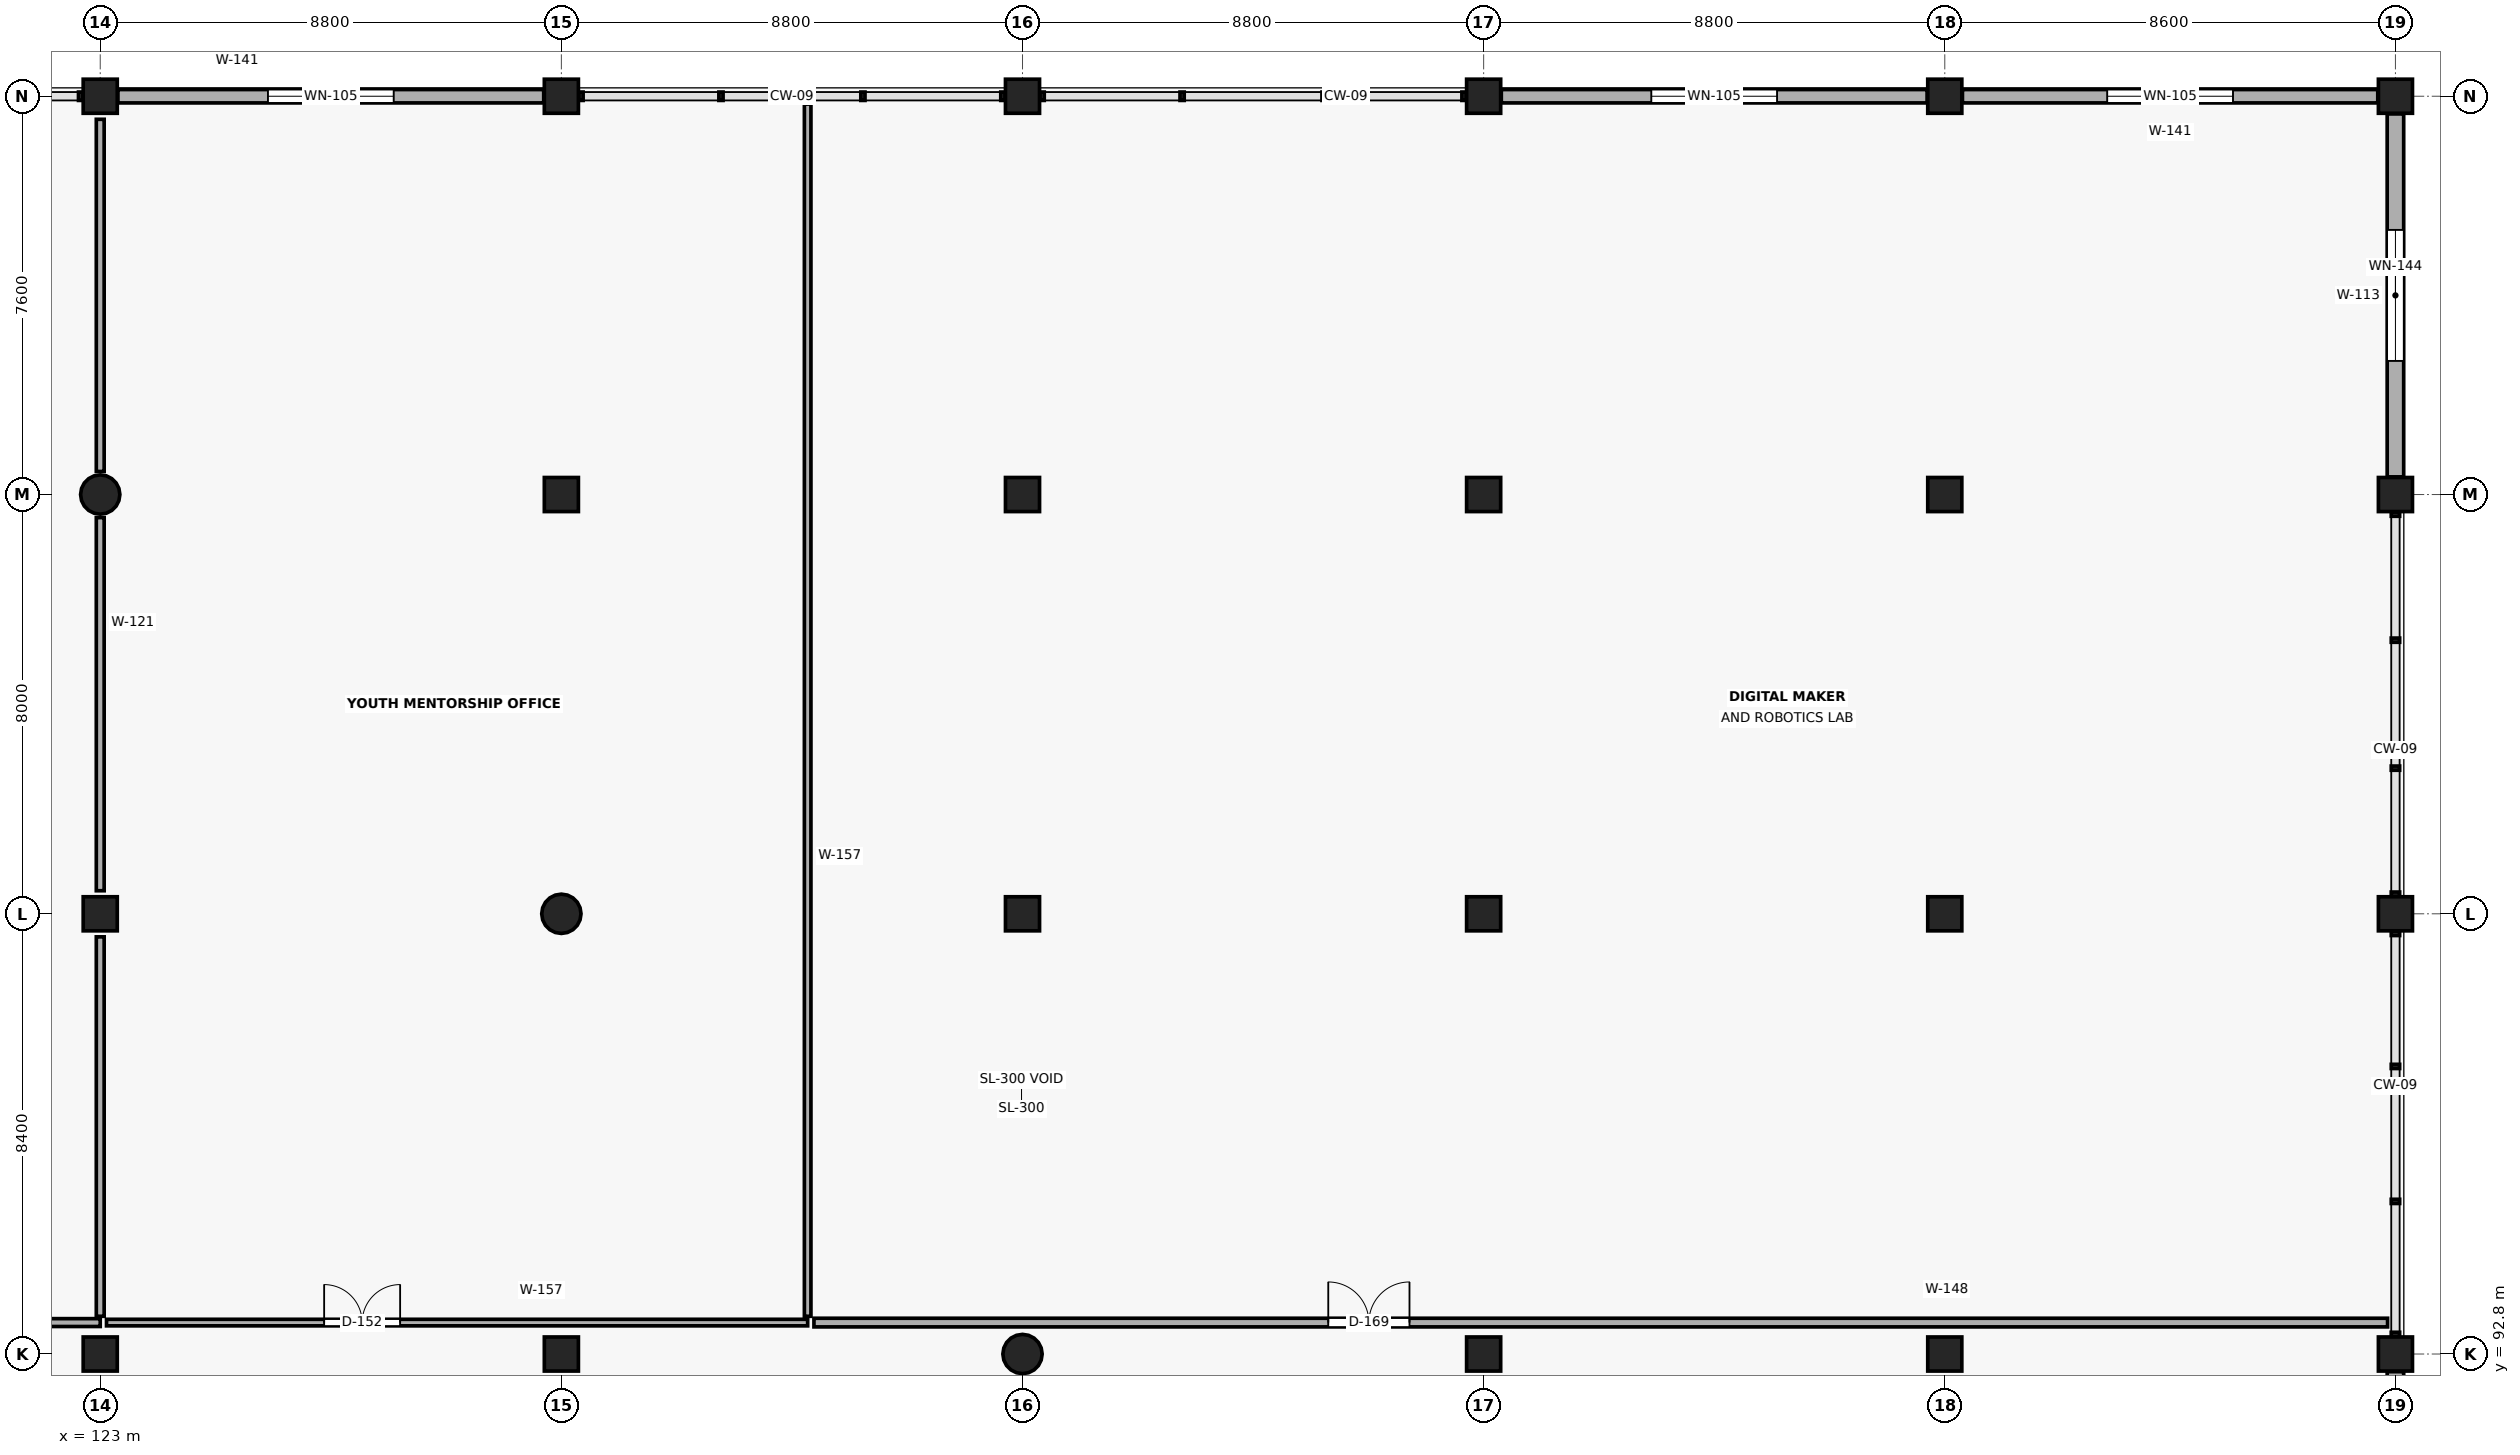
"""IFC4 building model, lengths in metres.
Left out: names, types, materials, properties, quantities, classifications, styles, units other than length and angle.
Written with IfcOpenShell. Run it as: python <this file> out.ifc"""

import sys

from ifc_helpers import new_model, si_unit, direction, frame, frame_2d, origin, origin_2d, place, context, subcontext, project, spatial, rectangle, circle, extrude, element, fill, save


model = new_model("IFC4")
c1 = context("Model", 3, precision=1e-05, world=origin(), true_north=direction((0.0, 1.0)))
c2 = subcontext(c1, "Body", "Model", "MODEL_VIEW")
j1 = project(units=[si_unit("LENGTHUNIT", "METRE"), si_unit("PLANEANGLEUNIT", "RADIAN")], contexts=[c1])
p1 = place(None, origin())
s1 = spatial("IfcSite", under=j1, at=p1, CompositionType="ELEMENT")
p2 = place(p1, origin())
s2 = spatial("IfcBuilding", under=s1, at=p2, CompositionType="ELEMENT")
p3 = place(p2, frame((0.0, 0.0, 5.1)))
s3 = spatial("IfcBuildingStorey", under=s2, at=p3, CompositionType="ELEMENT", Elevation=5.1)
for number, where, z_axis, x_axis in (
    (1, (123.0, 92.8, 0.0), (0.0, 0.0, 1.0), (1.0, 0.0, 0.0)),
    (2, (123.0, 101.2, 0.0), (0.0, 0.0, 1.0), (1.0, 0.0, 0.0)),
):
    element("IfcColumn", number, at=place(p3, frame(where, z_axis=z_axis, x_axis=x_axis)), inside=s3, PredefinedType="COLUMN", context=c2, shape_type="SweptSolid", body=[
        extrude(rectangle(XDim=0.65, YDim=0.65, at=origin_2d()), origin(), (0.0, 0.0, 1.0), 4.8),
    ])
p4 = place(p3, frame((123.0, 109.2, 0.0), z_axis=(0.0, 0.0, 1.0), x_axis=(1.0, 0.0, 0.0)))
e3 = element("IfcColumn", 3, at=p4, inside=s3, PredefinedType="COLUMN", context=c2, shape_type="SweptSolid", body=[
    extrude(circle(Radius=0.375, at=origin_2d()), origin(), (0.0, 0.0, 1.0), 4.8),
])
for number, where, z_axis, x_axis in (
    (4, (123.0, 116.8, 0.0), (0.0, 0.0, 1.0), (1.0, 0.0, 0.0)),
    (5, (131.8, 92.8, 0.0), (0.0, 0.0, 1.0), (1.0, 0.0, 0.0)),
):
    element("IfcColumn", number, at=place(p3, frame(where, z_axis=z_axis, x_axis=x_axis)), inside=s3, PredefinedType="COLUMN", context=c2, shape_type="SweptSolid", body=[
        extrude(rectangle(XDim=0.65, YDim=0.65, at=origin_2d()), origin(), (0.0, 0.0, 1.0), 4.8),
    ])
p5 = place(p3, frame((131.8, 101.2, 0.0), z_axis=(0.0, 0.0, 1.0), x_axis=(1.0, 0.0, 0.0)))
e6 = element("IfcColumn", 6, at=p5, inside=s3, PredefinedType="COLUMN", context=c2, shape_type="SweptSolid", body=[
    extrude(circle(Radius=0.375, at=origin_2d()), origin(), (0.0, 0.0, 1.0), 4.8),
])
for number, where, z_axis, x_axis in (
    (7, (131.8, 109.2, 0.0), (0.0, 0.0, 1.0), (1.0, 0.0, 0.0)),
    (8, (131.8, 116.8, 0.0), (0.0, 0.0, 1.0), (1.0, 0.0, 0.0)),
):
    element("IfcColumn", number, at=place(p3, frame(where, z_axis=z_axis, x_axis=x_axis)), inside=s3, PredefinedType="COLUMN", context=c2, shape_type="SweptSolid", body=[
        extrude(rectangle(XDim=0.65, YDim=0.65, at=origin_2d()), origin(), (0.0, 0.0, 1.0), 4.8),
    ])
p6 = place(p3, frame((140.6, 92.8, 0.0), z_axis=(0.0, 0.0, 1.0), x_axis=(1.0, 0.0, 0.0)))
e9 = element("IfcColumn", 9, at=p6, inside=s3, PredefinedType="COLUMN", context=c2, shape_type="SweptSolid", body=[
    extrude(circle(Radius=0.375, at=origin_2d()), origin(), (0.0, 0.0, 1.0), 4.8),
])
for number, where, z_axis, x_axis in (
    (10, (140.6, 101.2, 0.0), (0.0, 0.0, 1.0), (1.0, 0.0, 0.0)),
    (11, (140.6, 109.2, 0.0), (0.0, 0.0, 1.0), (1.0, 0.0, 0.0)),
    (12, (140.6, 116.8, 0.0), (0.0, 0.0, 1.0), (1.0, 0.0, 0.0)),
    (13, (149.4, 92.8, 0.0), (0.0, 0.0, 1.0), (1.0, 0.0, 0.0)),
    (14, (149.4, 101.2, 0.0), (0.0, 0.0, 1.0), (1.0, 0.0, 0.0)),
    (15, (149.4, 109.2, 0.0), (0.0, 0.0, 1.0), (1.0, 0.0, 0.0)),
    (16, (149.4, 116.8, 0.0), (0.0, 0.0, 1.0), (1.0, 0.0, 0.0)),
    (17, (158.2, 92.8, 0.0), (0.0, 0.0, 1.0), (1.0, 0.0, 0.0)),
    (18, (158.2, 101.2, 0.0), (0.0, 0.0, 1.0), (1.0, 0.0, 0.0)),
    (19, (158.2, 109.2, 0.0), (0.0, 0.0, 1.0), (1.0, 0.0, 0.0)),
    (20, (158.2, 116.8, 0.0), (0.0, 0.0, 1.0), (1.0, 0.0, 0.0)),
    (21, (166.8, 92.8, 0.0), (0.0, 0.0, 1.0), (1.0, 0.0, 0.0)),
    (22, (166.8, 101.2, 0.0), (0.0, 0.0, 1.0), (1.0, 0.0, 0.0)),
    (23, (166.8, 109.2, 0.0), (0.0, 0.0, 1.0), (1.0, 0.0, 0.0)),
    (24, (166.8, 116.8, 0.0), (0.0, 0.0, 1.0), (1.0, 0.0, 0.0)),
):
    element("IfcColumn", number, at=place(p3, frame(where, z_axis=z_axis, x_axis=x_axis)), inside=s3, PredefinedType="COLUMN", context=c2, shape_type="SweptSolid", body=[
        extrude(rectangle(XDim=0.65, YDim=0.65, at=origin_2d()), origin(), (0.0, 0.0, 1.0), 4.8),
    ])
p7 = place(p3, frame((123.337, 116.8, 0.0), z_axis=(0.0, 0.0, 1.0), x_axis=(1.0, 0.0, 0.0)))
e25 = element("IfcWall", 25, at=p7, inside=s3, PredefinedType="SOLIDWALL", context=c2, shape_type="SweptSolid", body=[
    extrude(rectangle(XDim=8.126, YDim=0.255, at=frame_2d((4.063, 0.0))), origin(), (0.0, 0.0, 1.0), 3.61),
])
p8 = place(p7, frame((2.863, 0.0, 0.85)))
e26 = element("IfcOpeningElement", 26, at=p8, cuts=e25, PredefinedType="OPENING", context=c2, shape_type="SweptSolid", body=[
    extrude(rectangle(XDim=2.4, YDim=2.4, at=frame_2d((1.2, 1.2))), frame((0.0, 0.139, 0.0), z_axis=(0.0, -1.0, 0.0), x_axis=(1.0, 0.0, 0.0)), (0.0, 0.0, 1.0), 0.279),
])
p9 = place(p3, frame((149.737, 116.8, 0.0), z_axis=(0.0, 0.0, 1.0), x_axis=(1.0, 0.0, 0.0)))
e27 = element("IfcWall", 27, at=p9, inside=s3, PredefinedType="SOLIDWALL", context=c2, shape_type="SweptSolid", body=[
    extrude(rectangle(XDim=8.126, YDim=0.255, at=frame_2d((4.063, 0.0))), origin(), (0.0, 0.0, 1.0), 3.61),
])
p10 = place(p9, frame((2.863, 0.0, 0.85)))
e28 = element("IfcOpeningElement", 28, at=p10, cuts=e27, PredefinedType="OPENING", context=c2, shape_type="SweptSolid", body=[
    extrude(rectangle(XDim=2.4, YDim=2.4, at=frame_2d((1.2, 1.2))), frame((0.0, 0.139, 0.0), z_axis=(0.0, -1.0, 0.0), x_axis=(1.0, 0.0, 0.0)), (0.0, 0.0, 1.0), 0.279),
])
p11 = place(p3, frame((158.537, 116.8, 0.0), z_axis=(0.0, 0.0, 1.0), x_axis=(1.0, 0.0, 0.0)))
e29 = element("IfcWall", 29, at=p11, inside=s3, PredefinedType="SOLIDWALL", context=c2, shape_type="SweptSolid", body=[
    extrude(rectangle(XDim=7.926, YDim=0.255, at=frame_2d((3.963, 0.0))), origin(), (0.0, 0.0, 1.0), 3.61),
])
p12 = place(p11, frame((2.763, 0.0, 0.85)))
e30 = element("IfcOpeningElement", 30, at=p12, cuts=e29, PredefinedType="OPENING", context=c2, shape_type="SweptSolid", body=[
    extrude(rectangle(XDim=2.4, YDim=2.4, at=frame_2d((1.2, 1.2))), frame((0.0, 0.139, 0.0), z_axis=(0.0, -1.0, 0.0), x_axis=(1.0, 0.0, 0.0)), (0.0, 0.0, 1.0), 0.279),
])
p13 = place(p3, frame((166.8, 92.463, 0.0), z_axis=(0.0, 0.0, 1.0), x_axis=(0.0, -1.0, 0.0)))
e31 = element("IfcWall", 31, at=p13, inside=s3, PredefinedType="SOLIDWALL", context=c2, shape_type="SweptSolid", body=[
    extrude(rectangle(XDim=8.101, YDim=0.315, at=frame_2d((4.05, 0.0))), origin(), (0.0, 0.0, 1.0), 3.61),
])
p14 = place(p3, frame((166.8, 116.463, 0.0), z_axis=(0.0, 0.0, 1.0), x_axis=(0.0, -1.0, 0.0)))
e32 = element("IfcWall", 32, at=p14, inside=s3, PredefinedType="SOLIDWALL", context=c2, shape_type="SweptSolid", body=[
    extrude(rectangle(XDim=6.926, YDim=0.315, at=frame_2d((3.463, 0.0))), origin(), (0.0, 0.0, 1.0), 3.61),
])
p15 = place(p14, frame((2.213, 0.0, 0.85)))
e33 = element("IfcOpeningElement", 33, at=p15, cuts=e32, PredefinedType="OPENING", context=c2, shape_type="SweptSolid", body=[
    extrude(rectangle(XDim=2.5, YDim=2.4, at=frame_2d((1.25, 1.2))), frame((0.0, 0.169, 0.0), z_axis=(0.0, -1.0, 0.0), x_axis=(1.0, 0.0, 0.0)), (0.0, 0.0, 1.0), 0.339),
])
p16 = place(p3, frame((105.2, 93.4, 0.0), z_axis=(0.0, 0.0, 1.0), x_axis=(1.0, 0.0, 0.0)))
e34 = element("IfcWall", 34, at=p16, inside=s3, PredefinedType="PARTITIONING", context=c2, shape_type="SweptSolid", body=[
    extrude(rectangle(XDim=17.8, YDim=0.15, at=frame_2d((8.9, 0.0))), origin(), (0.0, 0.0, 1.0), 4.35),
])
p17 = place(p16, frame((5.796, 0.0, 0.0)))
e35 = element("IfcOpeningElement", 35, at=p17, cuts=e34, PredefinedType="OPENING", context=c2, shape_type="SweptSolid", body=[
    extrude(rectangle(XDim=1.4, YDim=2.3, at=frame_2d((0.7, 1.15))), frame((0.0, 0.087, 0.0), z_axis=(0.0, -1.0, 0.0), x_axis=(1.0, 0.0, 0.0)), (0.0, 0.0, 1.0), 0.174),
])
p18 = place(p3, frame((123.0, 93.52, 0.0), z_axis=(0.0, 0.0, 1.0), x_axis=(0.0, 1.0, 0.0)))
e36 = element("IfcWall", 36, at=p18, inside=s3, PredefinedType="PARTITIONING", context=c2, shape_type="SweptSolid", body=[
    extrude(rectangle(XDim=7.24, YDim=0.15, at=frame_2d((3.62, 0.0))), origin(), (0.0, 0.0, 1.0), 3.5),
])
p19 = place(p3, frame((123.0, 101.64, 0.0), z_axis=(0.0, 0.0, 1.0), x_axis=(0.0, 1.0, 0.0)))
e37 = element("IfcWall", 37, at=p19, inside=s3, PredefinedType="PARTITIONING", context=c2, shape_type="SweptSolid", body=[
    extrude(rectangle(XDim=7.12, YDim=0.15, at=frame_2d((3.56, 0.0))), origin(), (0.0, 0.0, 1.0), 3.5),
])
p20 = place(p3, frame((123.0, 109.64, 0.0), z_axis=(0.0, 0.0, 1.0), x_axis=(0.0, 1.0, 0.0)))
e38 = element("IfcWall", 38, at=p20, inside=s3, PredefinedType="PARTITIONING", context=c2, shape_type="SweptSolid", body=[
    extrude(rectangle(XDim=6.72, YDim=0.15, at=frame_2d((3.36, 0.0))), origin(), (0.0, 0.0, 1.0), 3.5),
])
p21 = place(p3, frame((123.12, 93.4, 0.0), z_axis=(0.0, 0.0, 1.0), x_axis=(1.0, 0.0, 0.0)))
e39 = element("IfcWall", 39, at=p21, inside=s3, PredefinedType="PARTITIONING", context=c2, shape_type="SweptSolid", body=[
    extrude(rectangle(XDim=13.38, YDim=0.125, at=frame_2d((6.69, 0.0))), origin(), (0.0, 0.0, 1.0), 4.35),
])
p22 = place(p21, frame((4.153, 0.0, 0.0)))
e40 = element("IfcOpeningElement", 40, at=p22, cuts=e39, PredefinedType="OPENING", context=c2, shape_type="SweptSolid", body=[
    extrude(rectangle(XDim=1.45, YDim=2.35, at=frame_2d((0.725, 1.175))), frame((0.0, 0.074, 0.0), z_axis=(0.0, -1.0, 0.0), x_axis=(1.0, 0.0, 0.0)), (0.0, 0.0, 1.0), 0.149),
])
p23 = place(p3, frame((136.5, 93.52, 0.0), z_axis=(0.0, 0.0, 1.0), x_axis=(0.0, 1.0, 0.0)))
e41 = element("IfcWall", 41, at=p23, inside=s3, PredefinedType="PARTITIONING", context=c2, shape_type="SweptSolid", body=[
    extrude(rectangle(XDim=23.13, YDim=0.125, at=frame_2d((11.565, 0.0))), origin(), (0.0, 0.0, 1.0), 4.35),
])
p24 = place(p3, frame((136.62, 93.4, 0.0), z_axis=(0.0, 0.0, 1.0), x_axis=(1.0, 0.0, 0.0)))
e42 = element("IfcWall", 42, at=p24, inside=s3, PredefinedType="PARTITIONING", context=c2, shape_type="SweptSolid", body=[
    extrude(rectangle(XDim=30.03, YDim=0.165, at=frame_2d((15.015, 0.0))), origin(), (0.0, 0.0, 1.0), 4.35),
])
p25 = place(p24, frame((9.815, 0.0, 0.0)))
e43 = element("IfcOpeningElement", 43, at=p25, cuts=e42, PredefinedType="OPENING", context=c2, shape_type="SweptSolid", body=[
    extrude(rectangle(XDim=1.55, YDim=2.35, at=frame_2d((0.775, 1.175))), frame((0.0, 0.094, 0.0), z_axis=(0.0, -1.0, 0.0), x_axis=(1.0, 0.0, 0.0)), (0.0, 0.0, 1.0), 0.189),
])
p26 = place(p8, origin())
e44 = element("IfcWindow", 44, at=p26, inside=s3, PartitioningType="SINGLE_PANEL", PredefinedType="WINDOW", context=c2, shape_type="SweptSolid", body=[
    extrude(rectangle(XDim=2.4, YDim=2.4, at=frame_2d((1.2, 1.2))), frame((0.0, 0.03, 0.0), z_axis=(0.0, -1.0, 0.0), x_axis=(1.0, 0.0, 0.0)), (0.0, 0.0, 1.0), 0.06),
])
fill(e26, e44)
p27 = place(p10, origin())
e45 = element("IfcWindow", 45, at=p27, inside=s3, PartitioningType="SINGLE_PANEL", PredefinedType="WINDOW", context=c2, shape_type="SweptSolid", body=[
    extrude(rectangle(XDim=2.4, YDim=2.4, at=frame_2d((1.2, 1.2))), frame((0.0, 0.03, 0.0), z_axis=(0.0, -1.0, 0.0), x_axis=(1.0, 0.0, 0.0)), (0.0, 0.0, 1.0), 0.06),
])
fill(e28, e45)
p28 = place(p12, origin())
e46 = element("IfcWindow", 46, at=p28, inside=s3, PartitioningType="SINGLE_PANEL", PredefinedType="WINDOW", context=c2, shape_type="SweptSolid", body=[
    extrude(rectangle(XDim=2.4, YDim=2.4, at=frame_2d((1.2, 1.2))), frame((0.0, 0.03, 0.0), z_axis=(0.0, -1.0, 0.0), x_axis=(1.0, 0.0, 0.0)), (0.0, 0.0, 1.0), 0.06),
])
fill(e30, e46)
p29 = place(p15, origin())
e47 = element("IfcWindow", 47, at=p29, inside=s3, PartitioningType="SINGLE_PANEL", PredefinedType="WINDOW", context=c2, shape_type="SweptSolid", body=[
    extrude(rectangle(XDim=2.5, YDim=2.4, at=frame_2d((1.25, 1.2))), frame((0.0, 0.03, 0.0), z_axis=(0.0, -1.0, 0.0), x_axis=(1.0, 0.0, 0.0)), (0.0, 0.0, 1.0), 0.06),
])
fill(e33, e47)
p30 = place(p22, origin())
e48 = element("IfcDoor", 48, at=p30, inside=s3, OperationType="DOUBLE_DOOR_SINGLE_SWING", PredefinedType="DOOR", context=c2, shape_type="SweptSolid", body=[
    extrude(rectangle(XDim=1.45, YDim=2.35, at=frame_2d((0.725, 1.175))), frame((0.0, 0.025, 0.0), z_axis=(0.0, -1.0, 0.0), x_axis=(1.0, 0.0, 0.0)), (0.0, 0.0, 1.0), 0.05),
])
fill(e40, e48)
p31 = place(p25, origin())
e49 = element("IfcDoor", 49, at=p31, inside=s3, OperationType="DOUBLE_DOOR_SINGLE_SWING", PredefinedType="DOOR", context=c2, shape_type="SweptSolid", body=[
    extrude(rectangle(XDim=1.55, YDim=2.35, at=frame_2d((0.775, 1.175))), frame((0.0, 0.025, 0.0), z_axis=(0.0, -1.0, 0.0), x_axis=(1.0, 0.0, 0.0)), (0.0, 0.0, 1.0), 0.05),
])
fill(e43, e49)
save(model, sys.argv[1])
